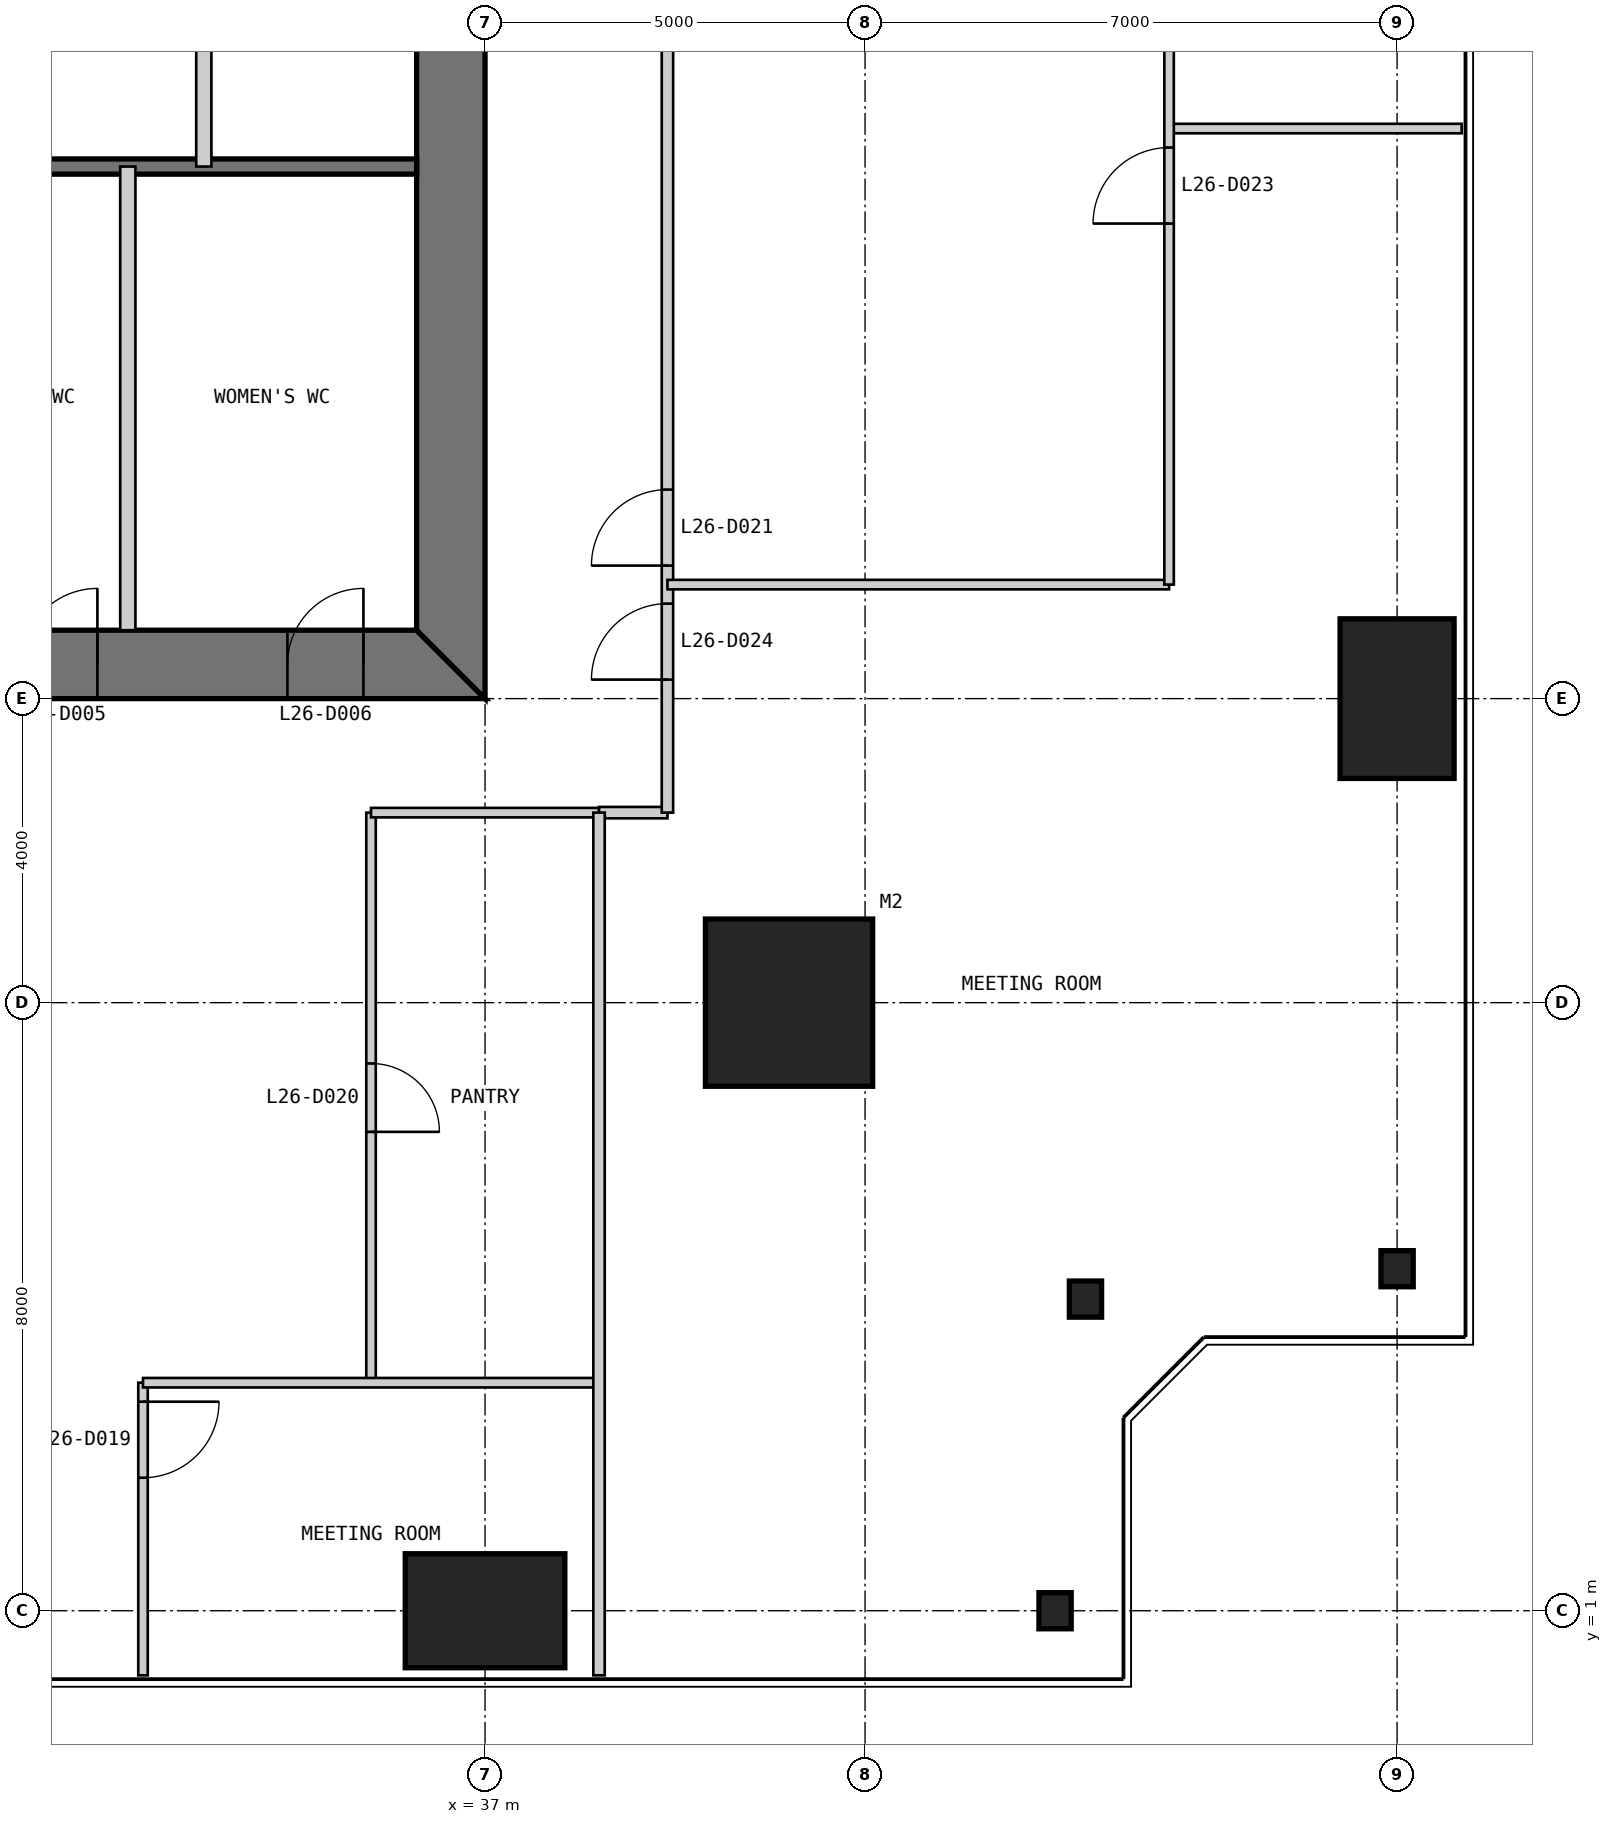
"""IFC4 building model, lengths in metres.
Left out: names, types, materials, properties, quantities, classifications, styles, units other than length and angle.
Written with IfcOpenShell. Run it as: python <this file> out.ifc"""

import sys

from ifc_helpers import new_model, si_unit, direction, frame, frame_2d, origin, origin_2d, place, context, subcontext, project, spatial, polyline, rectangle, i_section, outline, extrude, element, fill, save


model = new_model("IFC4")
c1 = context("Model", 3, precision=1e-05, world=origin(), true_north=direction((0.0, 1.0)))
c2 = subcontext(c1, "Body", "Model", "MODEL_VIEW")
j1 = project(units=[si_unit("LENGTHUNIT", "METRE"), si_unit("PLANEANGLEUNIT", "RADIAN")], contexts=[c1])
p1 = place(None, origin())
s1 = spatial("IfcSite", under=j1, at=p1, CompositionType="ELEMENT")
p2 = place(p1, origin())
s2 = spatial("IfcBuilding", under=s1, at=p2, CompositionType="ELEMENT")
p3 = place(p2, frame((0.0, 0.0, 114.4)))
s3 = spatial("IfcBuildingStorey", under=s2, at=p3, CompositionType="ELEMENT", Elevation=114.4)
p4 = place(p3, frame((41.0, 9.0, 0.0), z_axis=(0.0, 0.0, 1.0), x_axis=(1.0, 0.0, 0.0)))
e1 = element("IfcColumn", 1, at=p4, inside=s3, PredefinedType="COLUMN", context=c2, shape_type="SweptSolid", body=[
    extrude(rectangle(XDim=2.2, YDim=2.2, at=origin_2d()), origin(), (0.0, 0.0, 1.0), 4.0),
])
p5 = place(p3, frame((37.0, 1.0, 0.0), z_axis=(0.0, 0.0, 1.0), x_axis=(1.0, 0.0, 0.0)))
e2 = element("IfcColumn", 2, at=p5, inside=s3, PredefinedType="COLUMN", context=c2, shape_type="SweptSolid", body=[
    extrude(rectangle(XDim=2.1, YDim=1.5, at=origin_2d()), origin(), (0.0, 0.0, 1.0), 4.0),
])
for number, where, z_axis, x_axis in (
    (3, (44.5, 1.0, 0.0), (0.0, 0.0, 1.0), (1.0, 0.0, 0.0)),
    (4, (44.9, 5.1, 0.0), (0.0, 0.0, 1.0), (1.0, 0.0, 0.0)),
    (5, (49.0, 5.5, 0.0), (0.0, 0.0, 1.0), (1.0, 0.0, 0.0)),
):
    element("IfcColumn", number, at=place(p3, frame(where, z_axis=z_axis, x_axis=x_axis)), inside=s3, PredefinedType="COLUMN", context=c2, shape_type="SweptSolid", body=[
        extrude(i_section(OverallWidth=0.424, OverallDepth=0.475, WebThickness=0.048, FlangeThickness=0.077, at=origin_2d()), origin(), (0.0, 0.0, 1.0), 4.0),
    ])
p6 = place(p3, frame((49.0, 13.0, 0.0), z_axis=(0.0, 0.0, 1.0), x_axis=(1.0, 0.0, 0.0)))
e6 = element("IfcColumn", 6, at=p6, inside=s3, PredefinedType="COLUMN", context=c2, shape_type="SweptSolid", body=[
    extrude(rectangle(XDim=1.5, YDim=2.1, at=origin_2d()), origin(), (0.0, 0.0, 1.0), 4.0),
])
p7 = place(p3, frame((13.0, 13.45, 0.0), z_axis=(0.0, 0.0, 1.0), x_axis=(1.0, 0.0, 0.0)))
e7 = element("IfcWall", 7, at=p7, inside=s3, PredefinedType="SHEAR", context=c2, shape_type="SweptSolid", body=[
    extrude(outline(polyline([(0.0, -0.45), (24.0, -0.45), (23.1, 0.45), (0.9, 0.45), (0.0, -0.45)])), origin(), (0.0, 0.0, 1.0), 4.0),
])
p8 = place(p7, frame((4.9, 0.0, 0.0)))
e8 = element("IfcOpeningElement", 8, at=p8, cuts=e7, PredefinedType="OPENING", context=c2, shape_type="SweptSolid", body=[
    extrude(rectangle(XDim=1.0, YDim=2.2, at=frame_2d((0.5, 1.1))), frame((0.0, 0.46, 0.0), z_axis=(0.0, -1.0, 0.0), x_axis=(1.0, 0.0, 0.0)), (0.0, 0.0, 1.0), 0.92),
])
p9 = place(p7, frame((8.9, 0.0, 0.0)))
e9 = element("IfcOpeningElement", 9, at=p9, cuts=e7, PredefinedType="OPENING", context=c2, shape_type="SweptSolid", body=[
    extrude(rectangle(XDim=1.1, YDim=2.2, at=frame_2d((0.55, 1.1))), frame((0.0, 0.46, 0.0), z_axis=(0.0, -1.0, 0.0), x_axis=(1.0, 0.0, 0.0)), (0.0, 0.0, 1.0), 0.92),
])
p10 = place(p7, frame((15.05, 0.0, 0.0)))
e10 = element("IfcOpeningElement", 10, at=p10, cuts=e7, PredefinedType="OPENING", context=c2, shape_type="SweptSolid", body=[
    extrude(rectangle(XDim=0.9, YDim=2.2, at=frame_2d((0.45, 1.1))), frame((0.0, 0.46, 0.0), z_axis=(0.0, -1.0, 0.0), x_axis=(1.0, 0.0, 0.0)), (0.0, 0.0, 1.0), 0.92),
])
p11 = place(p7, frame((17.9, 0.0, 0.0)))
e11 = element("IfcOpeningElement", 11, at=p11, cuts=e7, PredefinedType="OPENING", context=c2, shape_type="SweptSolid", body=[
    extrude(rectangle(XDim=1.0, YDim=2.2, at=frame_2d((0.5, 1.1))), frame((0.0, 0.46, 0.0), z_axis=(0.0, -1.0, 0.0), x_axis=(1.0, 0.0, 0.0)), (0.0, 0.0, 1.0), 0.92),
])
p12 = place(p7, frame((21.4, 0.0, 0.0)))
e12 = element("IfcOpeningElement", 12, at=p12, cuts=e7, PredefinedType="OPENING", context=c2, shape_type="SweptSolid", body=[
    extrude(rectangle(XDim=1.0, YDim=2.2, at=frame_2d((0.5, 1.1))), frame((0.0, 0.46, 0.0), z_axis=(0.0, -1.0, 0.0), x_axis=(1.0, 0.0, 0.0)), (0.0, 0.0, 1.0), 0.92),
])
p13 = place(p3, frame((36.55, 13.9, 0.0), z_axis=(0.0, 0.0, 1.0), x_axis=(0.0, 1.0, 0.0)))
e13 = element("IfcWall", 13, at=p13, inside=s3, PredefinedType="SHEAR", context=c2, shape_type="SweptSolid", body=[
    extrude(outline(polyline([(-0.9, -0.45), (23.1, -0.45), (22.2, 0.45), (0.0, 0.45), (-0.9, -0.45)])), origin(), (0.0, 0.0, 1.0), 4.0),
])
p14 = place(p13, frame((20.2, 0.0, 0.0)))
e14 = element("IfcOpeningElement", 14, at=p14, cuts=e13, PredefinedType="OPENING", context=c2, shape_type="SweptSolid", body=[
    extrude(rectangle(XDim=1.0, YDim=2.2, at=frame_2d((0.5, 1.1))), frame((0.0, 0.46, 0.0), z_axis=(0.0, -1.0, 0.0), x_axis=(1.0, 0.0, 0.0)), (0.0, 0.0, 1.0), 0.92),
])
p15 = place(p13, frame((17.25, 0.0, 0.0)))
e15 = element("IfcOpeningElement", 15, at=p15, cuts=e13, PredefinedType="OPENING", context=c2, shape_type="SweptSolid", body=[
    extrude(rectangle(XDim=0.9, YDim=2.2, at=frame_2d((0.45, 1.1))), frame((0.0, 0.46, 0.0), z_axis=(0.0, -1.0, 0.0), x_axis=(1.0, 0.0, 0.0)), (0.0, 0.0, 1.0), 0.92),
])
p16 = place(p3, frame((20.3, 20.0, 0.0), z_axis=(0.0, 0.0, 1.0), x_axis=(1.0, 0.0, 0.0)))
e16 = element("IfcWall", 16, at=p16, inside=s3, PredefinedType="SOLIDWALL", context=c2, shape_type="SweptSolid", body=[
    extrude(rectangle(XDim=15.8, YDim=0.2, at=frame_2d((7.9, 0.0))), origin(), (0.0, 0.0, 1.0), 3.8),
])
p17 = place(p3, frame((32.3, 13.9, 0.0), z_axis=(0.0, 0.0, 1.0), x_axis=(0.0, 1.0, 0.0)))
e17 = element("IfcWall", 17, at=p17, inside=s3, PredefinedType="PARTITIONING", context=c2, shape_type="SweptSolid", body=[
    extrude(rectangle(XDim=6.1, YDim=0.2, at=frame_2d((3.05, 0.0))), origin(), (0.0, 0.0, 1.0), 3.8),
])
p18 = place(p3, frame((33.3, 36.1, 0.0), z_axis=(0.0, 0.0, 1.0), x_axis=(0.0, -1.0, 0.0)))
e18 = element("IfcWall", 18, at=p18, inside=s3, PredefinedType="PARTITIONING", context=c2, shape_type="SweptSolid", body=[
    extrude(rectangle(XDim=16.1, YDim=0.2, at=frame_2d((8.05, 0.0))), origin(), (0.0, 0.0, 1.0), 3.8),
])
p19 = place(p3, frame((32.5, 0.15, 0.0), z_axis=(0.0, 0.0, 1.0), x_axis=(0.0, 1.0, 0.0)))
e19 = element("IfcWall", 19, at=p19, inside=s3, PredefinedType="PARTITIONING", context=c2, shape_type="SweptSolid", body=[
    extrude(rectangle(XDim=3.85, YDim=0.125, at=frame_2d((1.925, 0.0))), origin(), (0.0, 0.0, 1.0), 3.85),
])
p20 = place(p19, frame((2.6, 0.0, 0.0)))
e20 = element("IfcOpeningElement", 20, at=p20, cuts=e19, PredefinedType="OPENING", context=c2, shape_type="SweptSolid", body=[
    extrude(rectangle(XDim=1.0, YDim=2.2, at=frame_2d((0.5, 1.1))), frame((0.0, 0.073, 0.0), z_axis=(0.0, -1.0, 0.0), x_axis=(1.0, 0.0, 0.0)), (0.0, 0.0, 1.0), 0.145),
])
p21 = place(p3, frame((35.5, 4.0, 0.0), z_axis=(0.0, 0.0, 1.0), x_axis=(0.0, 1.0, 0.0)))
e21 = element("IfcWall", 21, at=p21, inside=s3, PredefinedType="PARTITIONING", context=c2, shape_type="SweptSolid", body=[
    extrude(rectangle(XDim=7.5, YDim=0.125, at=frame_2d((3.75, 0.0))), origin(), (0.0, 0.0, 1.0), 3.85),
])
p22 = place(p21, frame((3.3, 0.0, 0.0)))
e22 = element("IfcOpeningElement", 22, at=p22, cuts=e21, PredefinedType="OPENING", context=c2, shape_type="SweptSolid", body=[
    extrude(rectangle(XDim=0.9, YDim=2.2, at=frame_2d((0.45, 1.1))), frame((0.0, 0.073, 0.0), z_axis=(0.0, -1.0, 0.0), x_axis=(1.0, 0.0, 0.0)), (0.0, 0.0, 1.0), 0.145),
])
p23 = place(p3, frame((32.5, 4.0, 0.0), z_axis=(0.0, 0.0, 1.0), x_axis=(1.0, 0.0, 0.0)))
e23 = element("IfcWall", 23, at=p23, inside=s3, PredefinedType="PARTITIONING", context=c2, shape_type="SweptSolid", body=[
    extrude(rectangle(XDim=6.0, YDim=0.125, at=frame_2d((3.0, 0.0))), origin(), (0.0, 0.0, 1.0), 3.85),
])
p24 = place(p3, frame((35.5, 11.5, 0.0), z_axis=(0.0, 0.0, 1.0), x_axis=(1.0, 0.0, 0.0)))
e24 = element("IfcWall", 24, at=p24, inside=s3, PredefinedType="PARTITIONING", context=c2, shape_type="SweptSolid", body=[
    extrude(rectangle(XDim=3.0, YDim=0.125, at=frame_2d((1.5, 0.0))), origin(), (0.0, 0.0, 1.0), 3.85),
])
p25 = place(p3, frame((38.5, 11.5, 0.0), z_axis=(0.0, 0.0, 1.0), x_axis=(1.0, 0.0, 0.0)))
e25 = element("IfcWall", 25, at=p25, inside=s3, PredefinedType="PARTITIONING", context=c2, shape_type="SweptSolid", body=[
    extrude(rectangle(XDim=0.9, YDim=0.15, at=frame_2d((0.45, 0.0))), origin(), (0.0, 0.0, 1.0), 3.85),
])
p26 = place(p3, frame((39.4, 11.5, 0.0), z_axis=(0.0, 0.0, 1.0), x_axis=(0.0, 1.0, 0.0)))
e26 = element("IfcWall", 26, at=p26, inside=s3, PredefinedType="PARTITIONING", context=c2, shape_type="SweptSolid", body=[
    extrude(rectangle(XDim=27.0, YDim=0.15, at=frame_2d((13.5, 0.0))), origin(), (0.0, 0.0, 1.0), 3.85),
])
p27 = place(p26, frame((3.25, 0.0, 0.0)))
e27 = element("IfcOpeningElement", 27, at=p27, cuts=e26, PredefinedType="OPENING", context=c2, shape_type="SweptSolid", body=[
    extrude(rectangle(XDim=1.0, YDim=2.2, at=frame_2d((0.5, 1.1))), frame((0.0, 0.085, 0.0), z_axis=(0.0, -1.0, 0.0), x_axis=(1.0, 0.0, 0.0)), (0.0, 0.0, 1.0), 0.17),
])
p28 = place(p26, frame((25.75, 0.0, 0.0)))
e28 = element("IfcOpeningElement", 28, at=p28, cuts=e26, PredefinedType="OPENING", context=c2, shape_type="SweptSolid", body=[
    extrude(rectangle(XDim=1.0, YDim=2.2, at=frame_2d((0.5, 1.1))), frame((0.0, 0.085, 0.0), z_axis=(0.0, -1.0, 0.0), x_axis=(1.0, 0.0, 0.0)), (0.0, 0.0, 1.0), 0.17),
])
p29 = place(p26, frame((1.75, 0.0, 0.0)))
e29 = element("IfcOpeningElement", 29, at=p29, cuts=e26, PredefinedType="OPENING", context=c2, shape_type="SweptSolid", body=[
    extrude(rectangle(XDim=1.0, YDim=2.2, at=frame_2d((0.5, 1.1))), frame((0.0, 0.085, 0.0), z_axis=(0.0, -1.0, 0.0), x_axis=(1.0, 0.0, 0.0)), (0.0, 0.0, 1.0), 0.17),
])
p30 = place(p3, frame((38.5, 0.15, 0.0), z_axis=(0.0, 0.0, 1.0), x_axis=(0.0, 1.0, 0.0)))
e30 = element("IfcWall", 30, at=p30, inside=s3, PredefinedType="PARTITIONING", context=c2, shape_type="SweptSolid", body=[
    extrude(rectangle(XDim=11.35, YDim=0.15, at=frame_2d((5.675, 0.0))), origin(), (0.0, 0.0, 1.0), 3.85),
])
p31 = place(p3, frame((46.0, 14.5, 0.0), z_axis=(0.0, 0.0, 1.0), x_axis=(-1.0, 0.0, 0.0)))
e31 = element("IfcWall", 31, at=p31, inside=s3, PredefinedType="PARTITIONING", context=c2, shape_type="SweptSolid", body=[
    extrude(rectangle(XDim=6.6, YDim=0.125, at=frame_2d((3.3, 0.0))), origin(), (0.0, 0.0, 1.0), 3.85),
])
p32 = place(p3, frame((49.85, 20.5, 0.0), z_axis=(0.0, 0.0, 1.0), x_axis=(-1.0, 0.0, 0.0)))
e32 = element("IfcWall", 32, at=p32, inside=s3, PredefinedType="PARTITIONING", context=c2, shape_type="SweptSolid", body=[
    extrude(rectangle(XDim=3.85, YDim=0.125, at=frame_2d((1.925, 0.0))), origin(), (0.0, 0.0, 1.0), 3.85),
])
p33 = place(p3, frame((46.0, 14.5, 0.0), z_axis=(0.0, 0.0, 1.0), x_axis=(0.0, 1.0, 0.0)))
e33 = element("IfcWall", 33, at=p33, inside=s3, PredefinedType="PARTITIONING", context=c2, shape_type="SweptSolid", body=[
    extrude(rectangle(XDim=24.0, YDim=0.125, at=frame_2d((12.0, 0.0))), origin(), (0.0, 0.0, 1.0), 3.238),
])
p34 = place(p33, frame((4.75, 0.0, 0.0)))
e34 = element("IfcOpeningElement", 34, at=p34, cuts=e33, PredefinedType="OPENING", context=c2, shape_type="SweptSolid", body=[
    extrude(rectangle(XDim=1.0, YDim=2.2, at=frame_2d((0.5, 1.1))), frame((0.0, 0.073, 0.0), z_axis=(0.0, -1.0, 0.0), x_axis=(1.0, 0.0, 0.0)), (0.0, 0.0, 1.0), 0.145),
])
p35 = place(p33, frame((10.0, 0.0, 0.0)))
e35 = element("IfcOpeningElement", 35, at=p35, cuts=e33, PredefinedType="OPENING", context=c2, shape_type="SweptSolid", body=[
    extrude(rectangle(XDim=1.0, YDim=2.2, at=frame_2d((0.5, 1.1))), frame((0.0, 0.073, 0.0), z_axis=(0.0, -1.0, 0.0), x_axis=(1.0, 0.0, 0.0)), (0.0, 0.0, 1.0), 0.145),
])
p36 = place(p33, frame((16.0, 0.0, 0.0)))
e36 = element("IfcOpeningElement", 36, at=p36, cuts=e33, PredefinedType="OPENING", context=c2, shape_type="SweptSolid", body=[
    extrude(rectangle(XDim=1.0, YDim=2.2, at=frame_2d((0.5, 1.1))), frame((0.0, 0.073, 0.0), z_axis=(0.0, -1.0, 0.0), x_axis=(1.0, 0.0, 0.0)), (0.0, 0.0, 1.0), 0.145),
])
p37 = place(p33, frame((22.0, 0.0, 0.0)))
e37 = element("IfcOpeningElement", 37, at=p37, cuts=e33, PredefinedType="OPENING", context=c2, shape_type="SweptSolid", body=[
    extrude(rectangle(XDim=1.0, YDim=2.2, at=frame_2d((0.5, 1.1))), frame((0.0, 0.073, 0.0), z_axis=(0.0, -1.0, 0.0), x_axis=(1.0, 0.0, 0.0)), (0.0, 0.0, 1.0), 0.145),
])
p38 = place(p11, origin())
e38 = element("IfcDoor", 38, at=p38, inside=s3, OperationType="SINGLE_SWING_RIGHT", PredefinedType="DOOR", context=c2, shape_type="SweptSolid", body=[
    extrude(rectangle(XDim=1.0, YDim=2.2, at=frame_2d((0.5, 1.1))), frame((0.0, 0.025, 0.0), z_axis=(0.0, -1.0, 0.0), x_axis=(1.0, 0.0, 0.0)), (0.0, 0.0, 1.0), 0.05),
    extrude(outline(polyline([(0.0, 0.0), (0.04, 0.0), (0.04, 2.16), (0.96, 2.16), (0.96, 0.0), (1.0, 0.0), (1.0, 2.2), (0.0, 2.2), (0.0, 0.0)])), frame((0.0, 0.3, 0.0), z_axis=(0.0, -1.0, 0.0), x_axis=(1.0, 0.0, 0.0)), (0.0, 0.0, 1.0), 0.6),
])
fill(e11, e38)
p39 = place(p12, origin())
e39 = element("IfcDoor", 39, at=p39, inside=s3, OperationType="SINGLE_SWING_RIGHT", PredefinedType="DOOR", context=c2, shape_type="SweptSolid", body=[
    extrude(rectangle(XDim=1.0, YDim=2.2, at=frame_2d((0.5, 1.1))), frame((0.0, 0.025, 0.0), z_axis=(0.0, -1.0, 0.0), x_axis=(1.0, 0.0, 0.0)), (0.0, 0.0, 1.0), 0.05),
    extrude(outline(polyline([(0.0, 0.0), (0.04, 0.0), (0.04, 2.16), (0.96, 2.16), (0.96, 0.0), (1.0, 0.0), (1.0, 2.2), (0.0, 2.2), (0.0, 0.0)])), frame((0.0, 0.3, 0.0), z_axis=(0.0, -1.0, 0.0), x_axis=(1.0, 0.0, 0.0)), (0.0, 0.0, 1.0), 0.6),
])
fill(e12, e39)
p40 = place(p20, frame((1.0, 0.0, 0.0), z_axis=(0.0, 0.0, 1.0), x_axis=(-1.0, 0.0, 0.0)))
e40 = element("IfcDoor", 40, at=p40, inside=s3, OperationType="SINGLE_SWING_LEFT", PredefinedType="DOOR", context=c2, shape_type="SweptSolid", body=[
    extrude(rectangle(XDim=1.0, YDim=2.2, at=frame_2d((0.5, 1.1))), frame((0.0, 0.025, 0.0), z_axis=(0.0, -1.0, 0.0), x_axis=(1.0, 0.0, 0.0)), (0.0, 0.0, 1.0), 0.05),
])
fill(e20, e40)
p41 = place(p22, frame((0.9, 0.0, 0.0), z_axis=(0.0, 0.0, 1.0), x_axis=(-1.0, 0.0, 0.0)))
e41 = element("IfcDoor", 41, at=p41, inside=s3, OperationType="SINGLE_SWING_RIGHT", PredefinedType="DOOR", context=c2, shape_type="SweptSolid", body=[
    extrude(rectangle(XDim=0.9, YDim=2.2, at=frame_2d((0.45, 1.1))), frame((0.0, 0.025, 0.0), z_axis=(0.0, -1.0, 0.0), x_axis=(1.0, 0.0, 0.0)), (0.0, 0.0, 1.0), 0.05),
])
fill(e22, e41)
p42 = place(p27, origin())
e42 = element("IfcDoor", 42, at=p42, inside=s3, OperationType="SINGLE_SWING_LEFT", PredefinedType="DOOR", context=c2, shape_type="SweptSolid", body=[
    extrude(rectangle(XDim=1.0, YDim=2.2, at=frame_2d((0.5, 1.1))), frame((0.0, 0.025, 0.0), z_axis=(0.0, -1.0, 0.0), x_axis=(1.0, 0.0, 0.0)), (0.0, 0.0, 1.0), 0.05),
])
fill(e27, e42)
p43 = place(p34, origin())
e43 = element("IfcDoor", 43, at=p43, inside=s3, OperationType="SINGLE_SWING_LEFT", PredefinedType="DOOR", context=c2, shape_type="SweptSolid", body=[
    extrude(rectangle(XDim=1.0, YDim=2.2, at=frame_2d((0.5, 1.1))), frame((0.0, 0.025, 0.0), z_axis=(0.0, -1.0, 0.0), x_axis=(1.0, 0.0, 0.0)), (0.0, 0.0, 1.0), 0.05),
])
fill(e34, e43)
p44 = place(p29, origin())
e44 = element("IfcDoor", 44, at=p44, inside=s3, OperationType="SINGLE_SWING_LEFT", PredefinedType="DOOR", context=c2, shape_type="SweptSolid", body=[
    extrude(rectangle(XDim=1.0, YDim=2.2, at=frame_2d((0.5, 1.1))), frame((0.0, 0.025, 0.0), z_axis=(0.0, -1.0, 0.0), x_axis=(1.0, 0.0, 0.0)), (0.0, 0.0, 1.0), 0.05),
])
fill(e29, e44)
save(model, sys.argv[1])
